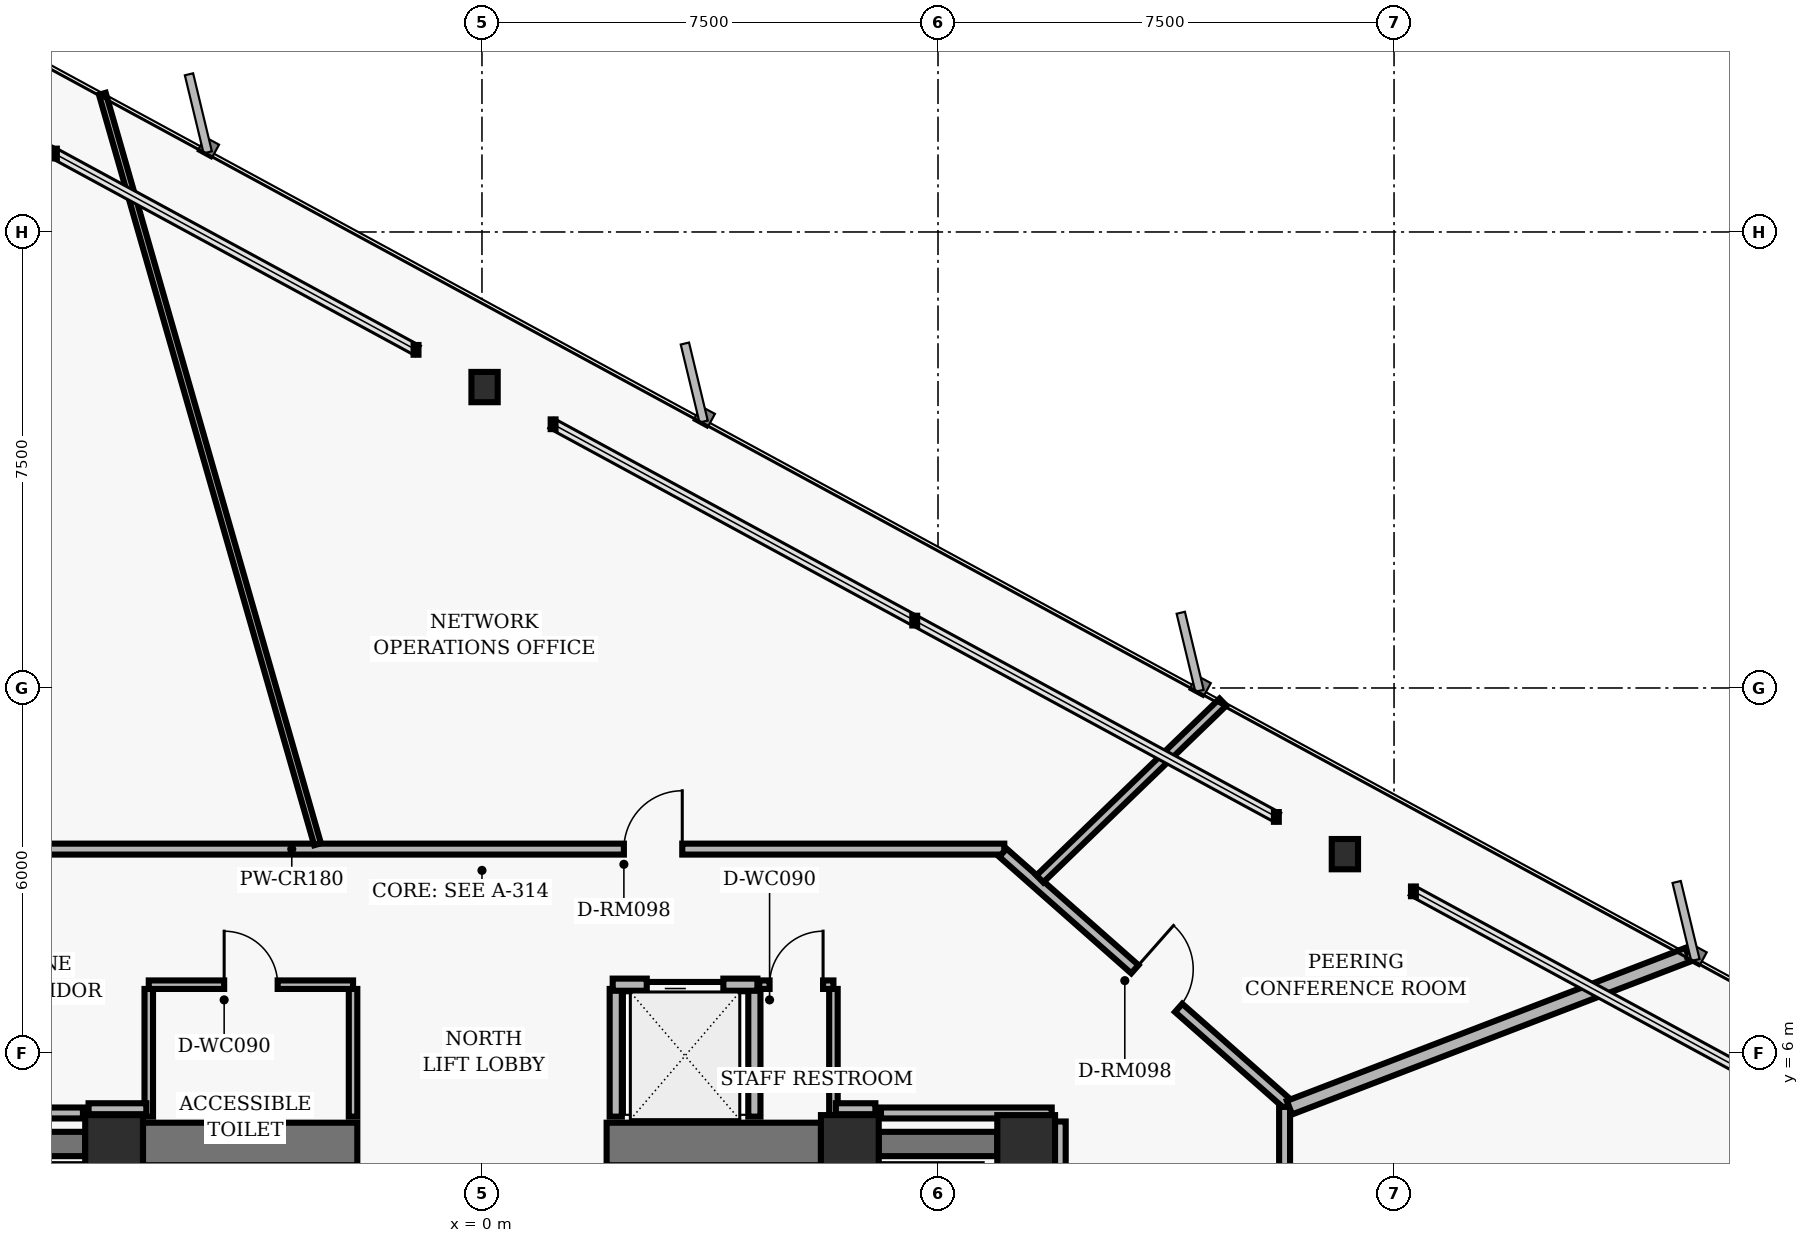
"""IFC4 building model, lengths in metres.
Left out: names, types, materials, properties, quantities, classifications, styles, units other than length and angle.
Written with IfcOpenShell. Run it as: python <this file> out.ifc"""

import sys

from ifc_helpers import new_model, si_unit, direction, frame, frame_2d, origin, origin_2d, place, context, subcontext, project, spatial, rectangle, hollow_rectangle, i_section, extrude, element, fill, save


model = new_model("IFC4")
c1 = context("Model", 3, precision=1e-05, world=origin(), true_north=direction((0.0, 1.0)))
c2 = subcontext(c1, "Body", "Model", "MODEL_VIEW")
j1 = project(units=[si_unit("LENGTHUNIT", "METRE"), si_unit("PLANEANGLEUNIT", "RADIAN")], contexts=[c1])
p1 = place(None, origin())
s1 = spatial("IfcSite", under=j1, at=p1, CompositionType="ELEMENT")
p2 = place(p1, origin())
s2 = spatial("IfcBuilding", under=s1, at=p2, CompositionType="ELEMENT")
p3 = place(p2, frame((0.0, 0.0, 25.6)))
s3 = spatial("IfcBuildingStorey", under=s2, at=p3, CompositionType="ELEMENT", Elevation=25.6)
for number, where, z_axis, x_axis in (
    (1, (-6.05, 4.5, 0.0), (0.0, 0.0, 1.0), (1.0, 0.0, 0.0)),
    (2, (6.05, 4.5, 0.0), (0.0, 0.0, 1.0), (1.0, 0.0, 0.0)),
    (3, (8.95, 4.5, 0.0), (0.0, 0.0, 1.0), (1.0, 0.0, 0.0)),
):
    element("IfcColumn", number, at=place(p3, frame(where, z_axis=z_axis, x_axis=x_axis)), inside=s3, PredefinedType="COLUMN", context=c2, shape_type="SweptSolid", body=[
        extrude(hollow_rectangle(XDim=0.95, YDim=0.95, WallThickness=0.06, InnerFilletRadius=0.02, OuterFilletRadius=0.04, at=origin_2d()), origin(), (0.0, 0.0, 1.0), 3.36),
    ])
for number, where, z_axis, x_axis in (
    (4, (-5.575, 4.5, 0.0), (0.0, 0.0, 1.0), (1.0, 0.0, 0.0)),
    (5, (2.05, 4.5, 0.0), (0.0, 0.0, 1.0), (1.0, 0.0, 0.0)),
):
    element("IfcWall", number, at=place(p3, frame(where, z_axis=z_axis, x_axis=x_axis)), inside=s3, PredefinedType="SHEAR", context=c2, shape_type="SweptSolid", body=[
        extrude(rectangle(XDim=3.525, YDim=0.7, at=frame_2d((1.762, 0.0))), origin(), (0.0, 0.0, 1.0), 3.098),
    ])
for number, where, z_axis, x_axis in (
    (6, (-8.475, 4.5, 0.0), (0.0, 0.0, 1.0), (1.0, 0.0, 0.0)),
    (7, (6.525, 4.5, 0.0), (0.0, 0.0, 1.0), (1.0, 0.0, 0.0)),
):
    element("IfcWall", number, at=place(p3, frame(where, z_axis=z_axis, x_axis=x_axis)), inside=s3, PredefinedType="SHEAR", context=c2, shape_type="SweptSolid", body=[
        extrude(rectangle(XDim=1.95, YDim=0.4, at=frame_2d((0.975, 0.0))), origin(), (0.0, 0.0, 1.0), 3.098),
    ])
for number, where, z_axis, x_axis in (
    (8, (14.192, 9.267, 0.0), (0.0, 0.0, 1.0), (1.0, 0.0, 0.0)),
    (9, (0.043, 16.949, 0.0), (0.0, 0.0, 1.0), (1.0, 0.0, 0.0)),
):
    element("IfcColumn", number, at=place(p3, frame(where, z_axis=z_axis, x_axis=x_axis)), inside=s3, PredefinedType="COLUMN", context=c2, shape_type="SweptSolid", body=[
        extrude(i_section(OverallWidth=0.432, OverallDepth=0.498, WebThickness=0.056, FlangeThickness=0.089, FilletRadius=0.025, at=origin_2d()), origin(), (0.0, 0.0, 1.0), 3.36),
    ])
for number, where, z_axis, x_axis in (
    (10, (2.2, 4.95, 0.0), (0.0, 0.0, 1.0), (0.0, 1.0, 0.0)),
    (11, (4.48, 4.95, 0.0), (0.0, 0.0, 1.0), (0.0, 1.0, 0.0)),
):
    element("IfcWall", number, at=place(p3, frame(where, z_axis=z_axis, x_axis=x_axis)), inside=s3, PredefinedType="PARTITIONING", context=c2, shape_type="SweptSolid", body=[
        extrude(rectangle(XDim=2.1, YDim=0.2, at=frame_2d((1.05, 0.0))), origin(), (0.0, 0.0, 1.0), 3.073),
    ])
p4 = place(p3, frame((2.15, 7.12, 0.0), z_axis=(0.0, 0.0, 1.0), x_axis=(1.0, 0.0, 0.0)))
e12 = element("IfcWall", 12, at=p4, inside=s3, PredefinedType="PARTITIONING", context=c2, shape_type="SweptSolid", body=[
    extrude(rectangle(XDim=2.38, YDim=0.2, at=frame_2d((1.19, 0.0))), origin(), (0.0, 0.0, 1.0), 3.073),
])
p5 = place(p4, frame((0.56, 0.0, 0.0)))
e13 = element("IfcOpeningElement", 13, at=p5, cuts=e12, PredefinedType="OPENING", context=c2, shape_type="SweptSolid", body=[
    extrude(rectangle(XDim=1.26, YDim=2.06, at=frame_2d((0.63, 1.03))), frame((0.0, 0.11, 0.0), z_axis=(0.0, -1.0, 0.0), x_axis=(1.0, 0.0, 0.0)), (0.0, 0.0, 1.0), 0.22),
])
for number, where, z_axis, x_axis in (
    (14, (-5.48, 4.95, 0.0), (0.0, 0.0, 1.0), (0.0, 1.0, 0.0)),
    (15, (-2.12, 4.95, 0.0), (0.0, 0.0, 1.0), (0.0, 1.0, 0.0)),
):
    element("IfcWall", number, at=place(p3, frame(where, z_axis=z_axis, x_axis=x_axis)), inside=s3, PredefinedType="PARTITIONING", context=c2, shape_type="SweptSolid", body=[
        extrude(rectangle(XDim=2.1, YDim=0.14, at=frame_2d((1.05, 0.0))), origin(), (0.0, 0.0, 1.0), 3.073),
    ])
p6 = place(p3, frame((-5.48, 7.12, 0.0), z_axis=(0.0, 0.0, 1.0), x_axis=(1.0, 0.0, 0.0)))
e16 = element("IfcWall", 16, at=p6, inside=s3, PredefinedType="PARTITIONING", context=c2, shape_type="SweptSolid", body=[
    extrude(rectangle(XDim=3.36, YDim=0.14, at=frame_2d((1.68, 0.0))), origin(), (0.0, 0.0, 1.0), 3.073),
])
p7 = place(p6, frame((1.24, 0.0, 0.0)))
e17 = element("IfcOpeningElement", 17, at=p7, cuts=e16, PredefinedType="OPENING", context=c2, shape_type="SweptSolid", body=[
    extrude(rectangle(XDim=0.88, YDim=2.02, at=frame_2d((0.44, 1.01))), frame((0.0, 0.08, 0.0), z_axis=(0.0, -1.0, 0.0), x_axis=(1.0, 0.0, 0.0)), (0.0, 0.0, 1.0), 0.16),
])
p8 = place(p3, frame((5.78, 4.95, 0.0), z_axis=(0.0, 0.0, 1.0), x_axis=(0.0, 1.0, 0.0)))
e18 = element("IfcWall", 18, at=p8, inside=s3, PredefinedType="PARTITIONING", context=c2, shape_type="SweptSolid", body=[
    extrude(rectangle(XDim=2.1, YDim=0.14, at=frame_2d((1.05, 0.0))), origin(), (0.0, 0.0, 1.0), 3.073),
])
p9 = place(p3, frame((4.56, 7.12, 0.0), z_axis=(0.0, 0.0, 1.0), x_axis=(1.0, 0.0, 0.0)))
e19 = element("IfcWall", 19, at=p9, inside=s3, PredefinedType="PARTITIONING", context=c2, shape_type="SweptSolid", body=[
    extrude(rectangle(XDim=1.22, YDim=0.14, at=frame_2d((0.61, 0.0))), origin(), (0.0, 0.0, 1.0), 3.073),
])
p10 = place(p9, frame((0.17, 0.0, 0.0)))
e20 = element("IfcOpeningElement", 20, at=p10, cuts=e19, PredefinedType="OPENING", context=c2, shape_type="SweptSolid", body=[
    extrude(rectangle(XDim=0.88, YDim=2.02, at=frame_2d((0.44, 1.01))), frame((0.0, 0.08, 0.0), z_axis=(0.0, -1.0, 0.0), x_axis=(1.0, 0.0, 0.0)), (0.0, 0.0, 1.0), 0.16),
])
p11 = place(p3, frame((-8.59, 9.35, 0.0), z_axis=(0.0, 0.0, 1.0), x_axis=(1.0, 0.0, 0.0)))
e21 = element("IfcWall", 21, at=p11, inside=s3, PredefinedType="PARTITIONING", context=c2, shape_type="SweptSolid", body=[
    extrude(rectangle(XDim=17.18, YDim=0.18, at=frame_2d((8.59, 0.0))), origin(), (0.0, 0.0, 1.0), 2.587),
])
p12 = place(p11, frame((10.924, 0.0, 0.0)))
e22 = element("IfcOpeningElement", 22, at=p12, cuts=e21, PredefinedType="OPENING", context=c2, shape_type="SweptSolid", body=[
    extrude(rectangle(XDim=0.96, YDim=2.02, at=frame_2d((0.48, 1.01))), frame((0.0, 0.1, 0.0), z_axis=(0.0, -1.0, 0.0), x_axis=(1.0, 0.0, 0.0)), (0.0, 0.0, 1.0), 0.2),
])
p13 = place(p3, frame((8.567, 9.29, 0.0), z_axis=(0.0, 0.0, 1.0), x_axis=(0.749626463267, -0.66186113768, 0.0)))
e23 = element("IfcWall", 23, at=p13, inside=s3, PredefinedType="PARTITIONING", context=c2, shape_type="SweptSolid", body=[
    extrude(rectangle(XDim=6.27, YDim=0.18, at=frame_2d((3.135, 0.0))), origin(), (0.0, 0.0, 1.0), 2.587),
])
p14 = place(p13, frame((2.895, 0.0, 0.0)))
e24 = element("IfcOpeningElement", 24, at=p14, cuts=e23, PredefinedType="OPENING", context=c2, shape_type="SweptSolid", body=[
    extrude(rectangle(XDim=0.96, YDim=2.02, at=frame_2d((0.48, 1.01))), frame((0.0, 0.1, 0.0), z_axis=(0.0, -1.0, 0.0), x_axis=(1.0, 0.0, 0.0)), (0.0, 0.0, 1.0), 0.2),
])
p15 = place(p3, frame((13.2, 5.11, 0.0), z_axis=(0.0, 0.0, 1.0), x_axis=(0.0, -1.0, 0.0)))
e25 = element("IfcWall", 25, at=p15, inside=s3, PredefinedType="PARTITIONING", context=c2, shape_type="SweptSolid", body=[
    extrude(rectangle(XDim=10.22, YDim=0.18, at=frame_2d((5.11, 0.0))), origin(), (0.0, 0.0, 1.0), 3.073),
])
p16 = place(p15, frame((4.591, 0.0, 0.0)))
e26 = element("IfcOpeningElement", 26, at=p16, cuts=e25, PredefinedType="OPENING", context=c2, shape_type="SweptSolid", body=[
    extrude(rectangle(XDim=1.02, YDim=2.02, at=frame_2d((0.51, 1.01))), frame((0.0, 0.1, 0.0), z_axis=(0.0, -1.0, 0.0), x_axis=(1.0, 0.0, 0.0)), (0.0, 0.0, 1.0), 0.2),
])
p17 = place(p3, frame((9.51, -4.87, 0.0), z_axis=(0.0, 0.0, 1.0), x_axis=(0.0, 1.0, 0.0)))
e27 = element("IfcWall", 27, at=p17, inside=s3, PredefinedType="PARTITIONING", context=c2, shape_type="SweptSolid", body=[
    extrude(rectangle(XDim=9.74, YDim=0.18, at=frame_2d((4.87, 0.0))), origin(), (0.0, 0.0, 1.0), 3.073),
])
p18 = place(p3, frame((9.37, 5.01, 0.0), z_axis=(0.0, 0.0, 1.0), x_axis=(-1.0, 0.0, 0.0)))
e28 = element("IfcWall", 28, at=p18, inside=s3, PredefinedType="PARTITIONING", context=c2, shape_type="SweptSolid", body=[
    extrude(rectangle(XDim=2.808, YDim=0.18, at=frame_2d((1.404, 0.0))), origin(), (0.0, 0.0, 1.0), 3.073),
])
p19 = place(p3, frame((6.47, 5.08, 0.0), z_axis=(0.0, 0.0, 1.0), x_axis=(-1.0, 0.0, 0.0)))
e29 = element("IfcWall", 29, at=p19, inside=s3, PredefinedType="PARTITIONING", context=c2, shape_type="SweptSolid", body=[
    extrude(rectangle(XDim=0.65, YDim=0.18, at=frame_2d((0.325, 0.0))), origin(), (0.0, 0.0, 1.0), 3.073),
])
p20 = place(p3, frame((-5.52, 5.08, 0.0), z_axis=(0.0, 0.0, 1.0), x_axis=(-1.0, 0.0, 0.0)))
e30 = element("IfcWall", 30, at=p20, inside=s3, PredefinedType="PARTITIONING", context=c2, shape_type="SweptSolid", body=[
    extrude(rectangle(XDim=0.95, YDim=0.18, at=frame_2d((0.475, 0.0))), origin(), (0.0, 0.0, 1.0), 3.073),
])
p21 = place(p3, frame((-6.562, 5.01, 0.0), z_axis=(0.0, 0.0, 1.0), x_axis=(-1.0, 0.0, 0.0)))
e31 = element("IfcWall", 31, at=p21, inside=s3, PredefinedType="PARTITIONING", context=c2, shape_type="SweptSolid", body=[
    extrude(rectangle(XDim=2.808, YDim=0.18, at=frame_2d((1.404, 0.0))), origin(), (0.0, 0.0, 1.0), 3.073),
])
p22 = place(p3, frame((13.28, 5.098, 0.0), z_axis=(0.0, 0.0, 1.0), x_axis=(0.933577510578, 0.358375545681, 0.0)))
e32 = element("IfcWall", 32, at=p22, inside=s3, PredefinedType="PARTITIONING", context=c2, shape_type="SweptSolid", body=[
    extrude(rectangle(XDim=7.021, YDim=0.24, at=frame_2d((3.511, 0.0))), origin(), (0.0, 0.0, 1.0), 3.073),
])
p23 = place(p3, frame((9.175, 8.861, 0.0), z_axis=(0.0, 0.0, 1.0), x_axis=(0.719367279815, 0.694629913502, 0.0)))
e33 = element("IfcWall", 33, at=p23, inside=s3, PredefinedType="PARTITIONING", context=c2, shape_type="SweptSolid", body=[
    extrude(rectangle(XDim=4.185, YDim=0.16, at=frame_2d((2.092, 0.0))), origin(), (0.0, 0.0, 1.0), 3.073),
])
p24 = place(p3, frame((-2.704, 9.43, 0.0), z_axis=(0.0, 0.0, 1.0), x_axis=(-0.275627518328, 0.961264516738, 0.0)))
e34 = element("IfcWall", 34, at=p24, inside=s3, PredefinedType="MOVABLE", context=c2, shape_type="SweptSolid", body=[
    extrude(rectangle(XDim=12.841, YDim=0.115, at=frame_2d((6.42, 0.0))), origin(), (0.0, 0.0, 1.0), 3.073),
])
p25 = place(p5, origin())
e35 = element("IfcDoor", 35, at=p25, inside=s3, OperationType="SLIDING_TO_LEFT", PredefinedType="DOOR", context=c2, shape_type="SweptSolid", body=[
    extrude(rectangle(XDim=1.26, YDim=2.06, at=frame_2d((0.63, 1.03))), frame((0.0, 0.025, 0.0), z_axis=(0.0, -1.0, 0.0), x_axis=(1.0, 0.0, 0.0)), (0.0, 0.0, 1.0), 0.05),
])
fill(e13, e35)
p26 = place(p7, origin())
e36 = element("IfcDoor", 36, at=p26, inside=s3, OperationType="SINGLE_SWING_LEFT", PredefinedType="DOOR", context=c2, shape_type="SweptSolid", body=[
    extrude(rectangle(XDim=0.88, YDim=2.02, at=frame_2d((0.44, 1.01))), frame((0.0, 0.025, 0.0), z_axis=(0.0, -1.0, 0.0), x_axis=(1.0, 0.0, 0.0)), (0.0, 0.0, 1.0), 0.05),
])
fill(e17, e36)
p27 = place(p10, origin())
e37 = element("IfcDoor", 37, at=p27, inside=s3, OperationType="SINGLE_SWING_RIGHT", PredefinedType="DOOR", context=c2, shape_type="SweptSolid", body=[
    extrude(rectangle(XDim=0.88, YDim=2.02, at=frame_2d((0.44, 1.01))), frame((0.0, 0.025, 0.0), z_axis=(0.0, -1.0, 0.0), x_axis=(1.0, 0.0, 0.0)), (0.0, 0.0, 1.0), 0.05),
])
fill(e20, e37)
p28 = place(p14, origin())
e38 = element("IfcDoor", 38, at=p28, inside=s3, OperationType="SINGLE_SWING_LEFT", PredefinedType="DOOR", context=c2, shape_type="SweptSolid", body=[
    extrude(rectangle(XDim=0.96, YDim=2.02, at=frame_2d((0.48, 1.01))), frame((0.0, 0.025, 0.0), z_axis=(0.0, -1.0, 0.0), x_axis=(1.0, 0.0, 0.0)), (0.0, 0.0, 1.0), 0.05),
])
fill(e24, e38)
p29 = place(p12, origin())
e39 = element("IfcDoor", 39, at=p29, inside=s3, OperationType="SINGLE_SWING_RIGHT", PredefinedType="DOOR", context=c2, shape_type="SweptSolid", body=[
    extrude(rectangle(XDim=0.96, YDim=2.02, at=frame_2d((0.48, 1.01))), frame((0.0, 0.025, 0.0), z_axis=(0.0, -1.0, 0.0), x_axis=(1.0, 0.0, 0.0)), (0.0, 0.0, 1.0), 0.05),
])
fill(e22, e39)
save(model, sys.argv[1])
